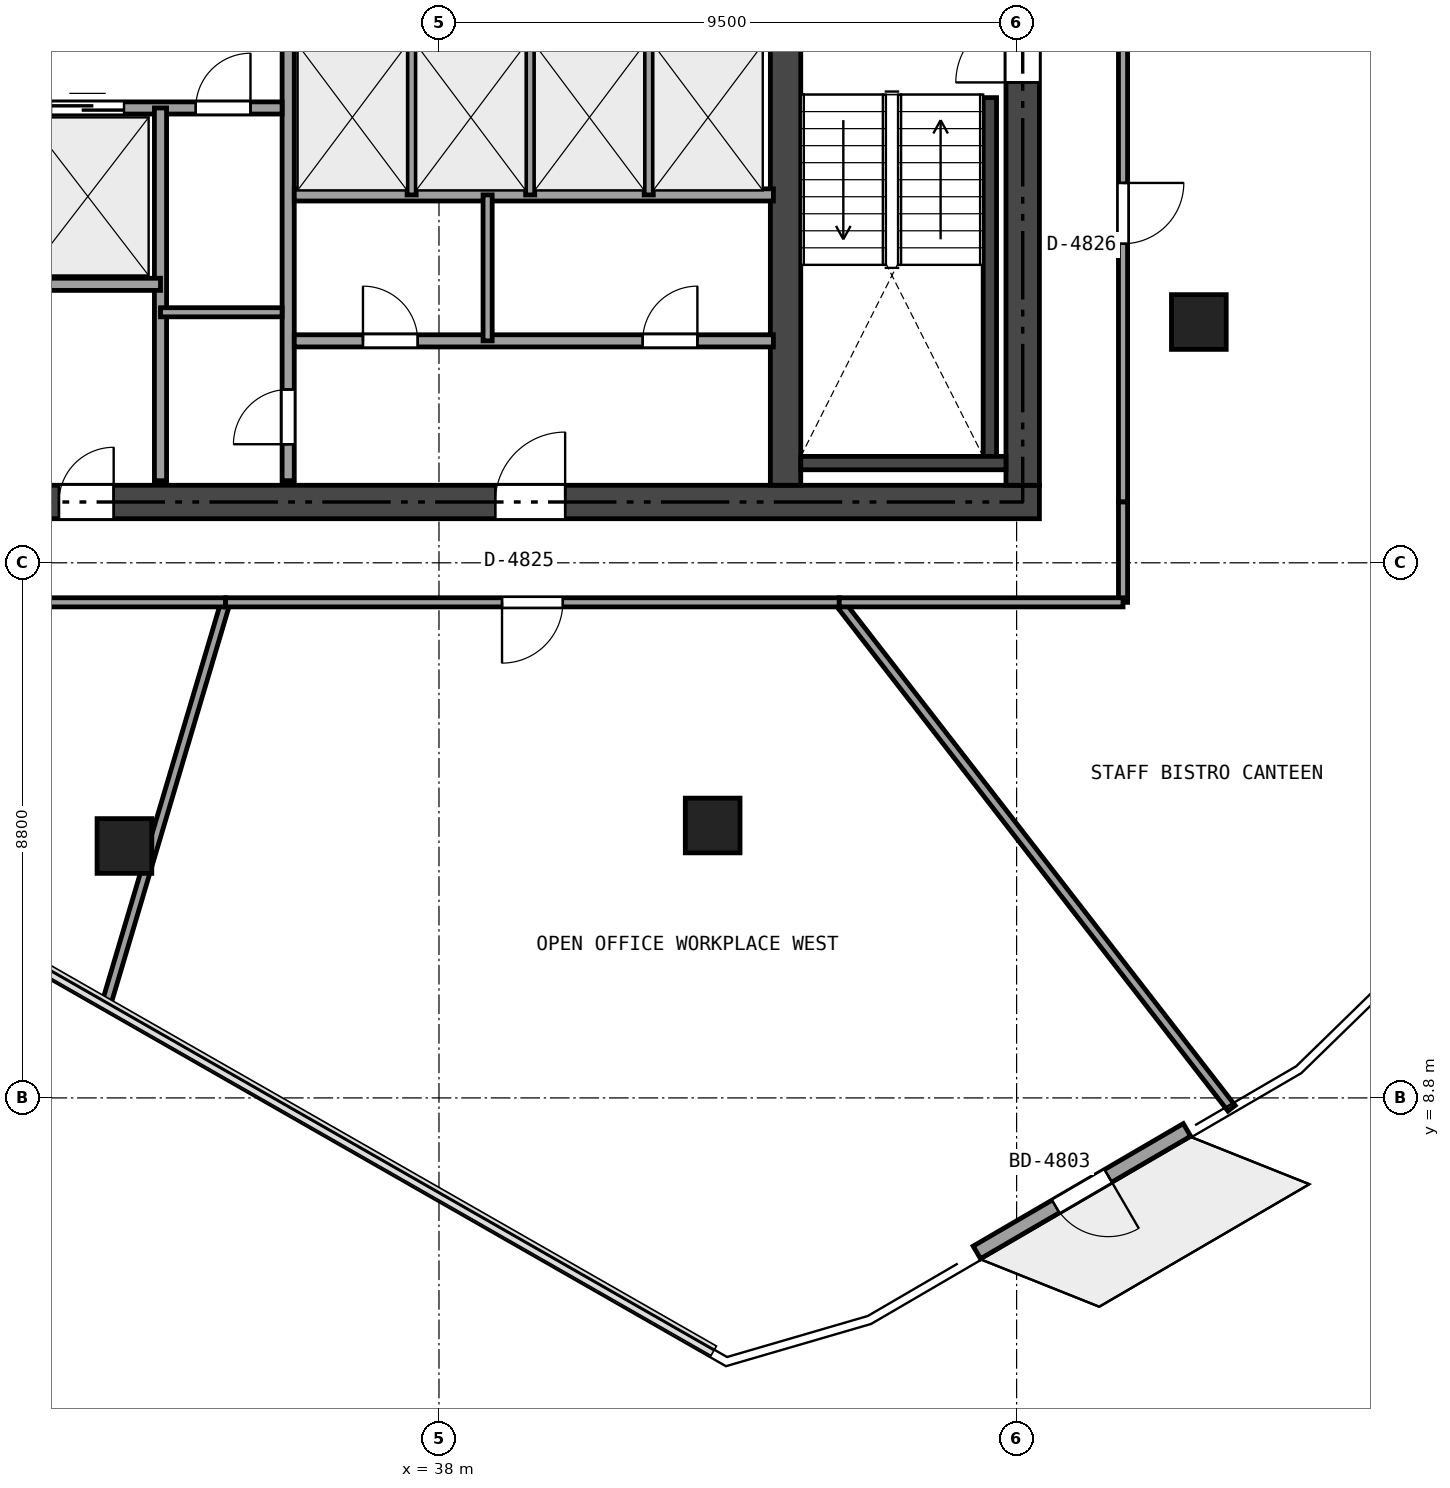
"""IFC4 building model, lengths in metres.
Left out: names, types, materials, properties, quantities, classifications, styles, units other than length and angle.
Written with IfcOpenShell. Run it as: python <this file> out.ifc"""

import sys

from ifc_helpers import new_model, si_unit, direction, frame, frame_2d, origin, origin_2d, place, context, subcontext, project, spatial, rectangle, extrude, element, fill, save


model = new_model("IFC4")
c1 = context("Model", 3, precision=1e-05, world=origin(), true_north=direction((0.0, 1.0)))
c2 = subcontext(c1, "Body", "Model", "MODEL_VIEW")
j1 = project(units=[si_unit("LENGTHUNIT", "METRE"), si_unit("PLANEANGLEUNIT", "RADIAN")], contexts=[c1])
p1 = place(None, origin())
s1 = spatial("IfcSite", under=j1, at=p1, CompositionType="ELEMENT")
p2 = place(p1, origin())
s2 = spatial("IfcBuilding", under=s1, at=p2, CompositionType="ELEMENT")
p3 = place(p2, frame((0.0, 0.0, 180.6)))
s3 = spatial("IfcBuildingStorey", under=s2, at=p3, CompositionType="ELEMENT", Elevation=180.6)
p4 = place(p3, frame((26.525, 18.6, 0.0), z_axis=(0.0, 0.0, 1.0), x_axis=(1.0, 0.0, 0.0)))
e1 = element("IfcWall", 1, at=p4, inside=s3, PredefinedType="SHEAR", context=c2, shape_type="SweptSolid", body=[
    extrude(rectangle(XDim=21.35, YDim=0.55, at=frame_2d((10.675, 0.0))), origin(), (0.0, 0.0, 1.0), 3.32),
])
p5 = place(p4, frame((12.4, 0.0, 0.0)))
e2 = element("IfcOpeningElement", 2, at=p5, cuts=e1, PredefinedType="OPENING", context=c2, shape_type="SweptSolid", body=[
    extrude(rectangle(XDim=1.15, YDim=2.15, at=frame_2d((0.575, 1.075))), frame((0.0, 0.285, 0.0), z_axis=(0.0, -1.0, 0.0), x_axis=(1.0, 0.0, 0.0)), (0.0, 0.0, 1.0), 0.57),
])
p6 = place(p4, frame((5.225, 0.0, 0.0)))
e3 = element("IfcOpeningElement", 3, at=p6, cuts=e1, PredefinedType="OPENING", context=c2, shape_type="SweptSolid", body=[
    extrude(rectangle(XDim=0.9, YDim=2.1, at=frame_2d((0.45, 1.05))), frame((0.0, 0.285, 0.0), z_axis=(0.0, -1.0, 0.0), x_axis=(1.0, 0.0, 0.0)), (0.0, 0.0, 1.0), 0.57),
])
p7 = place(p3, frame((47.6, 18.875, 0.0), z_axis=(0.0, 0.0, 1.0), x_axis=(0.0, 1.0, 0.0)))
e4 = element("IfcWall", 4, at=p7, inside=s3, PredefinedType="SHEAR", context=c2, shape_type="SweptSolid", body=[
    extrude(rectangle(XDim=15.05, YDim=0.55, at=frame_2d((7.525, 0.0))), origin(), (0.0, 0.0, 1.0), 3.32),
])
p8 = place(p7, frame((6.625, 0.0, 0.0)))
e5 = element("IfcOpeningElement", 5, at=p8, cuts=e4, PredefinedType="OPENING", context=c2, shape_type="SweptSolid", body=[
    extrude(rectangle(XDim=1.1, YDim=2.15, at=frame_2d((0.55, 1.075))), frame((0.0, 0.285, 0.0), z_axis=(0.0, -1.0, 0.0), x_axis=(1.0, 0.0, 0.0)), (0.0, 0.0, 1.0), 0.57),
])
p9 = place(p7, frame((8.525, 0.0, 0.0)))
e6 = element("IfcOpeningElement", 6, at=p9, cuts=e4, PredefinedType="OPENING", context=c2, shape_type="SweptSolid", body=[
    extrude(rectangle(XDim=0.9, YDim=2.1, at=frame_2d((0.45, 1.05))), frame((0.0, 0.285, 0.0), z_axis=(0.0, -1.0, 0.0), x_axis=(1.0, 0.0, 0.0)), (0.0, 0.0, 1.0), 0.57),
])
p10 = place(p7, frame((13.175, 0.0, 0.0)))
e7 = element("IfcOpeningElement", 7, at=p10, cuts=e4, PredefinedType="OPENING", context=c2, shape_type="SweptSolid", body=[
    extrude(rectangle(XDim=0.9, YDim=2.1, at=frame_2d((0.45, 1.05))), frame((0.0, 0.285, 0.0), z_axis=(0.0, -1.0, 0.0), x_axis=(1.0, 0.0, 0.0)), (0.0, 0.0, 1.0), 0.57),
])
p11 = place(p3, frame((43.7, 18.875, 0.0), z_axis=(0.0, 0.0, 1.0), x_axis=(0.0, 1.0, 0.0)))
e8 = element("IfcWall", 8, at=p11, inside=s3, PredefinedType="SHEAR", context=c2, shape_type="SweptSolid", body=[
    extrude(rectangle(XDim=15.05, YDim=0.5, at=frame_2d((7.525, 0.0))), origin(), (0.0, 0.0, 1.0), 3.32),
])
p12 = place(p11, frame((8.125, 0.0, 0.0)))
e9 = element("IfcOpeningElement", 9, at=p12, cuts=e8, PredefinedType="OPENING", context=c2, shape_type="SweptSolid", body=[
    extrude(rectangle(XDim=0.9, YDim=2.1, at=frame_2d((0.45, 1.05))), frame((0.0, 0.26, 0.0), z_axis=(0.0, -1.0, 0.0), x_axis=(1.0, 0.0, 0.0)), (0.0, 0.0, 1.0), 0.52),
])
p13 = place(p3, frame((47.06, 19.35, 0.0), z_axis=(0.0, 0.0, 1.0), x_axis=(0.0, 1.0, 0.0)))
e10 = element("IfcWall", 10, at=p13, inside=s3, PredefinedType="SHEAR", context=c2, shape_type="SweptSolid", body=[
    extrude(rectangle(XDim=5.9, YDim=0.22, at=frame_2d((2.95, 0.0))), origin(), (0.0, 0.0, 1.0), 3.32),
])
p14 = place(p3, frame((43.95, 19.24, 0.0), z_axis=(0.0, 0.0, 1.0), x_axis=(1.0, 0.0, 0.0)))
e11 = element("IfcWall", 11, at=p14, inside=s3, PredefinedType="SHEAR", context=c2, shape_type="SweptSolid", body=[
    extrude(rectangle(XDim=3.375, YDim=0.22, at=frame_2d((1.688, 0.0))), origin(), (0.0, 0.0, 1.0), 3.32),
])
for number, where, z_axis, x_axis in (
    (12, (32.827, 12.943, 0.0), (0.0, 0.0, 1.0), (1.0, 0.0, 0.0)),
    (13, (42.501, 13.28, 0.0), (0.0, 0.0, 1.0), (1.0, 0.0, 0.0)),
    (14, (50.497, 21.56, 0.0), (0.0, 0.0, 1.0), (1.0, 0.0, 0.0)),
):
    element("IfcColumn", number, at=place(p3, frame(where, z_axis=z_axis, x_axis=x_axis)), inside=s3, PredefinedType="COLUMN", context=c2, shape_type="SweptSolid", body=[
        extrude(rectangle(XDim=0.9, YDim=0.9, at=origin_2d()), origin(), (0.0, 0.0, 1.0), 3.32),
    ])
p15 = place(p3, frame((50.302, 8.274, 0.0), z_axis=(0.0, 0.0, 1.0), x_axis=(-0.863902826637, -0.50365852135, 0.0)))
e15 = element("IfcWall", 15, at=p15, inside=s3, PredefinedType="SOLIDWALL", context=c2, shape_type="SweptSolid", body=[
    extrude(rectangle(XDim=4.0, YDim=0.24, at=frame_2d((2.0, 0.0))), origin(), (0.0, 0.0, 1.0), 3.32),
])
p16 = place(p15, frame((1.5, 0.0, 0.0)))
e16 = element("IfcOpeningElement", 16, at=p16, cuts=e15, PredefinedType="OPENING", context=c2, shape_type="SweptSolid", body=[
    extrude(rectangle(XDim=1.0, YDim=2.15, at=frame_2d((0.5, 1.075))), frame((0.0, 0.13, 0.0), z_axis=(0.0, -1.0, 0.0), x_axis=(1.0, 0.0, 0.0)), (0.0, 0.0, 1.0), 0.26),
])
p17 = place(p3, frame((35.52, 18.95, 0.0), z_axis=(0.0, 0.0, 1.0), x_axis=(0.0, 1.0, 0.0)))
e17 = element("IfcWall", 17, at=p17, inside=s3, PredefinedType="SOLIDWALL", context=c2, shape_type="SweptSolid", body=[
    extrude(rectangle(XDim=14.9, YDim=0.2, at=frame_2d((7.45, 0.0))), origin(), (0.0, 0.0, 1.0), 2.841),
])
p18 = place(p17, frame((7.755, 0.0, 0.0)))
e18 = element("IfcOpeningElement", 18, at=p18, cuts=e17, PredefinedType="OPENING", context=c2, shape_type="SweptSolid", body=[
    extrude(rectangle(XDim=0.95, YDim=2.15, at=frame_2d((0.475, 1.075))), frame((0.0, 0.11, 0.0), z_axis=(0.0, -1.0, 0.0), x_axis=(1.0, 0.0, 0.0)), (0.0, 0.0, 1.0), 0.22),
])
p19 = place(p17, frame((0.6, 0.0, 0.0)))
e19 = element("IfcOpeningElement", 19, at=p19, cuts=e17, PredefinedType="OPENING", context=c2, shape_type="SweptSolid", body=[
    extrude(rectangle(XDim=0.9, YDim=2.1, at=frame_2d((0.45, 1.05))), frame((0.0, 0.11, 0.0), z_axis=(0.0, -1.0, 0.0), x_axis=(1.0, 0.0, 0.0)), (0.0, 0.0, 1.0), 0.22),
])
p20 = place(p3, frame((31.0, 25.08, 0.0), z_axis=(0.0, 0.0, 1.0), x_axis=(1.0, 0.0, 0.0)))
e20 = element("IfcWall", 20, at=p20, inside=s3, PredefinedType="SOLIDWALL", context=c2, shape_type="SweptSolid", body=[
    extrude(rectangle(XDim=4.42, YDim=0.2, at=frame_2d((2.21, 0.0))), origin(), (0.0, 0.0, 1.0), 3.32),
])
p21 = place(p20, frame((3.0, 0.0, 0.0)))
e21 = element("IfcOpeningElement", 21, at=p21, cuts=e20, PredefinedType="OPENING", context=c2, shape_type="SweptSolid", body=[
    extrude(rectangle(XDim=0.9, YDim=2.1, at=frame_2d((0.45, 1.05))), frame((0.0, 0.11, 0.0), z_axis=(0.0, -1.0, 0.0), x_axis=(1.0, 0.0, 0.0)), (0.0, 0.0, 1.0), 0.22),
])
p22 = place(p20, frame((0.62, 0.0, 0.0)))
e22 = element("IfcOpeningElement", 22, at=p22, cuts=e20, PredefinedType="OPENING", context=c2, shape_type="SweptSolid", body=[
    extrude(rectangle(XDim=1.2, YDim=2.15, at=frame_2d((0.6, 1.075))), frame((0.0, 0.11, 0.0), z_axis=(0.0, -1.0, 0.0), x_axis=(1.0, 0.0, 0.0)), (0.0, 0.0, 1.0), 0.22),
])
p23 = place(p3, frame((33.42, 18.95, 0.0), z_axis=(0.0, 0.0, 1.0), x_axis=(0.0, 1.0, 0.0)))
e23 = element("IfcWall", 23, at=p23, inside=s3, PredefinedType="SOLIDWALL", context=c2, shape_type="SweptSolid", body=[
    extrude(rectangle(XDim=6.13, YDim=0.2, at=frame_2d((3.065, 0.0))), origin(), (0.0, 0.0, 1.0), 2.841),
])
p24 = place(p3, frame((31.0, 22.18, 0.0), z_axis=(0.0, 0.0, 1.0), x_axis=(1.0, 0.0, 0.0)))
e24 = element("IfcWall", 24, at=p24, inside=s3, PredefinedType="SOLIDWALL", context=c2, shape_type="SweptSolid", body=[
    extrude(rectangle(XDim=2.42, YDim=0.2, at=frame_2d((1.21, 0.0))), origin(), (0.0, 0.0, 1.0), 3.32),
])
p25 = place(p3, frame((33.42, 21.72, 0.0), z_axis=(0.0, 0.0, 1.0), x_axis=(1.0, 0.0, 0.0)))
e25 = element("IfcWall", 25, at=p25, inside=s3, PredefinedType="PARTITIONING", context=c2, shape_type="SweptSolid", body=[
    extrude(rectangle(XDim=2.0, YDim=0.15, at=frame_2d((1.0, 0.0))), origin(), (0.0, 0.0, 1.0), 3.32),
])
p26 = place(p3, frame((35.62, 23.65, 0.0), z_axis=(0.0, 0.0, 1.0), x_axis=(1.0, 0.0, 0.0)))
e26 = element("IfcWall", 26, at=p26, inside=s3, PredefinedType="SOLIDWALL", context=c2, shape_type="SweptSolid", body=[
    extrude(rectangle(XDim=7.88, YDim=0.2, at=frame_2d((3.94, 0.0))), origin(), (0.0, 0.0, 1.0), 2.841),
])
p27 = place(p3, frame((35.62, 21.25, 0.0), z_axis=(0.0, 0.0, 1.0), x_axis=(1.0, 0.0, 0.0)))
e27 = element("IfcWall", 27, at=p27, inside=s3, PredefinedType="SOLIDWALL", context=c2, shape_type="SweptSolid", body=[
    extrude(rectangle(XDim=7.88, YDim=0.2, at=frame_2d((3.94, 0.0))), origin(), (0.0, 0.0, 1.0), 3.32),
])
p28 = place(p27, frame((1.13, 0.0, 0.0)))
e28 = element("IfcOpeningElement", 28, at=p28, cuts=e27, PredefinedType="OPENING", context=c2, shape_type="SweptSolid", body=[
    extrude(rectangle(XDim=0.9, YDim=2.1, at=frame_2d((0.45, 1.05))), frame((0.0, 0.11, 0.0), z_axis=(0.0, -1.0, 0.0), x_axis=(1.0, 0.0, 0.0)), (0.0, 0.0, 1.0), 0.22),
])
p29 = place(p27, frame((5.73, 0.0, 0.0)))
e29 = element("IfcOpeningElement", 29, at=p29, cuts=e27, PredefinedType="OPENING", context=c2, shape_type="SweptSolid", body=[
    extrude(rectangle(XDim=0.9, YDim=2.1, at=frame_2d((0.45, 1.05))), frame((0.0, 0.11, 0.0), z_axis=(0.0, -1.0, 0.0), x_axis=(1.0, 0.0, 0.0)), (0.0, 0.0, 1.0), 0.22),
])
for number, where, z_axis, x_axis in (
    (30, (37.55, 23.65, 0.0), (0.0, 0.0, 1.0), (0.0, 1.0, 0.0)),
    (31, (39.5, 23.65, 0.0), (0.0, 0.0, 1.0), (0.0, 1.0, 0.0)),
    (32, (41.45, 23.65, 0.0), (0.0, 0.0, 1.0), (0.0, 1.0, 0.0)),
):
    element("IfcWall", number, at=place(p3, frame(where, z_axis=z_axis, x_axis=x_axis)), inside=s3, PredefinedType="PARTITIONING", context=c2, shape_type="SweptSolid", body=[
        extrude(rectangle(XDim=2.55, YDim=0.15, at=frame_2d((1.275, 0.0))), origin(), (0.0, 0.0, 1.0), 2.841),
    ])
p30 = place(p3, frame((38.8, 21.25, 0.0), z_axis=(0.0, 0.0, 1.0), x_axis=(0.0, 1.0, 0.0)))
e33 = element("IfcWall", 33, at=p30, inside=s3, PredefinedType="PARTITIONING", context=c2, shape_type="SweptSolid", body=[
    extrude(rectangle(XDim=2.4, YDim=0.15, at=frame_2d((1.2, 0.0))), origin(), (0.0, 0.0, 1.0), 2.841),
])
p31 = place(p3, frame((32.518, 10.311, 0.0), z_axis=(0.0, 0.0, 1.0), x_axis=(0.284730403607, 0.958607634677, 0.0)))
e34 = element("IfcWall", 34, at=p31, inside=s3, PredefinedType="PARTITIONING", context=c2, shape_type="SweptSolid", body=[
    extrude(rectangle(XDim=6.926, YDim=0.15, at=frame_2d((3.463, 0.0))), origin(), (0.0, 0.0, 1.0), 2.905),
])
p32 = place(p3, frame((34.49, 16.95, 0.0), z_axis=(0.0, 0.0, 1.0), x_axis=(-1.0, 0.0, 0.0)))
e35 = element("IfcWall", 35, at=p32, inside=s3, PredefinedType="PARTITIONING", context=c2, shape_type="SweptSolid", body=[
    extrude(rectangle(XDim=7.69, YDim=0.15, at=frame_2d((3.845, 0.0))), origin(), (0.0, 0.0, 1.0), 2.697),
])
p33 = place(p32, frame((3.345, 0.0, 0.0)))
e36 = element("IfcOpeningElement", 36, at=p33, cuts=e35, PredefinedType="OPENING", context=c2, shape_type="SweptSolid", body=[
    extrude(rectangle(XDim=1.0, YDim=2.15, at=frame_2d((0.5, 1.075))), frame((0.0, 0.085, 0.0), z_axis=(0.0, -1.0, 0.0), x_axis=(1.0, 0.0, 0.0)), (0.0, 0.0, 1.0), 0.17),
])
p34 = place(p3, frame((51.035, 8.63, 0.0), z_axis=(0.0, 0.0, 1.0), x_axis=(-0.612800173813, 0.790237905301, 0.0)))
e37 = element("IfcWall", 37, at=p34, inside=s3, PredefinedType="PARTITIONING", context=c2, shape_type="SweptSolid", body=[
    extrude(rectangle(XDim=10.529, YDim=0.15, at=frame_2d((5.264, 0.0))), origin(), (0.0, 0.0, 1.0), 2.841),
])
p35 = place(p3, frame((44.583, 16.95, 0.0), z_axis=(0.0, 0.0, 1.0), x_axis=(-1.0, 0.0, 0.0)))
e38 = element("IfcWall", 38, at=p35, inside=s3, PredefinedType="PARTITIONING", context=c2, shape_type="SweptSolid", body=[
    extrude(rectangle(XDim=10.093, YDim=0.15, at=frame_2d((5.046, 0.0))), origin(), (0.0, 0.0, 1.0), 2.697),
])
p36 = place(p35, frame((4.546, 0.0, 0.0)))
e39 = element("IfcOpeningElement", 39, at=p36, cuts=e38, PredefinedType="OPENING", context=c2, shape_type="SweptSolid", body=[
    extrude(rectangle(XDim=1.0, YDim=2.15, at=frame_2d((0.5, 1.075))), frame((0.0, 0.085, 0.0), z_axis=(0.0, -1.0, 0.0), x_axis=(1.0, 0.0, 0.0)), (0.0, 0.0, 1.0), 0.17),
])
p37 = place(p3, frame((49.25, 28.094, 0.0), z_axis=(0.0, 0.0, 1.0), x_axis=(0.0, -1.0, 0.0)))
e40 = element("IfcWall", 40, at=p37, inside=s3, PredefinedType="PARTITIONING", context=c2, shape_type="SweptSolid", body=[
    extrude(rectangle(XDim=9.494, YDim=0.15, at=frame_2d((4.747, 0.0))), origin(), (0.0, 0.0, 1.0), 2.697),
])
p38 = place(p37, frame((4.247, 0.0, 0.0)))
e41 = element("IfcOpeningElement", 41, at=p38, cuts=e40, PredefinedType="OPENING", context=c2, shape_type="SweptSolid", body=[
    extrude(rectangle(XDim=1.0, YDim=2.15, at=frame_2d((0.5, 1.075))), frame((0.0, 0.085, 0.0), z_axis=(0.0, -1.0, 0.0), x_axis=(1.0, 0.0, 0.0)), (0.0, 0.0, 1.0), 0.17),
])
p39 = place(p3, frame((49.25, 18.6, 0.0), z_axis=(0.0, 0.0, 1.0), x_axis=(0.0, -1.0, 0.0)))
e42 = element("IfcWall", 42, at=p39, inside=s3, PredefinedType="PARTITIONING", context=c2, shape_type="SweptSolid", body=[
    extrude(rectangle(XDim=1.65, YDim=0.15, at=frame_2d((0.825, 0.0))), origin(), (0.0, 0.0, 1.0), 3.32),
])
p40 = place(p3, frame((49.25, 16.95, 0.0), z_axis=(0.0, 0.0, 1.0), x_axis=(-1.0, 0.0, 0.0)))
e43 = element("IfcWall", 43, at=p40, inside=s3, PredefinedType="PARTITIONING", context=c2, shape_type="SweptSolid", body=[
    extrude(rectangle(XDim=4.667, YDim=0.15, at=frame_2d((2.333, 0.0))), origin(), (0.0, 0.0, 1.0), 2.841),
])
p41 = place(p16, origin())
e44 = element("IfcDoor", 44, at=p41, inside=s3, OperationType="SINGLE_SWING_LEFT", PredefinedType="DOOR", context=c2, shape_type="SweptSolid", body=[
    extrude(rectangle(XDim=1.0, YDim=2.15, at=frame_2d((0.5, 1.075))), frame((0.0, 0.025, 0.0), z_axis=(0.0, -1.0, 0.0), x_axis=(1.0, 0.0, 0.0)), (0.0, 0.0, 1.0), 0.05),
])
fill(e16, e44)
p42 = place(p8, origin())
e45 = element("IfcDoor", 45, at=p42, inside=s3, OperationType="SINGLE_SWING_LEFT", PredefinedType="DOOR", context=c2, shape_type="SweptSolid", body=[
    extrude(rectangle(XDim=1.1, YDim=2.15, at=frame_2d((0.55, 1.075))), frame((0.0, 0.025, 0.0), z_axis=(0.0, -1.0, 0.0), x_axis=(1.0, 0.0, 0.0)), (0.0, 0.0, 1.0), 0.05),
])
fill(e5, e45)
p43 = place(p5, origin())
e46 = element("IfcDoor", 46, at=p43, inside=s3, OperationType="SINGLE_SWING_RIGHT", PredefinedType="DOOR", context=c2, shape_type="SweptSolid", body=[
    extrude(rectangle(XDim=1.15, YDim=2.15, at=frame_2d((0.575, 1.075))), frame((0.0, 0.025, 0.0), z_axis=(0.0, -1.0, 0.0), x_axis=(1.0, 0.0, 0.0)), (0.0, 0.0, 1.0), 0.05),
])
fill(e2, e46)
p44 = place(p6, origin())
e47 = element("IfcDoor", 47, at=p44, inside=s3, OperationType="SINGLE_SWING_RIGHT", PredefinedType="DOOR", context=c2, shape_type="SweptSolid", body=[
    extrude(rectangle(XDim=0.9, YDim=2.1, at=frame_2d((0.45, 1.05))), frame((0.0, 0.025, 0.0), z_axis=(0.0, -1.0, 0.0), x_axis=(1.0, 0.0, 0.0)), (0.0, 0.0, 1.0), 0.05),
])
fill(e3, e47)
p45 = place(p19, origin())
e48 = element("IfcDoor", 48, at=p45, inside=s3, OperationType="SINGLE_SWING_LEFT", PredefinedType="DOOR", context=c2, shape_type="SweptSolid", body=[
    extrude(rectangle(XDim=0.9, YDim=2.1, at=frame_2d((0.45, 1.05))), frame((0.0, 0.025, 0.0), z_axis=(0.0, -1.0, 0.0), x_axis=(1.0, 0.0, 0.0)), (0.0, 0.0, 1.0), 0.05),
])
fill(e19, e48)
p46 = place(p21, origin())
e49 = element("IfcDoor", 49, at=p46, inside=s3, OperationType="SINGLE_SWING_RIGHT", PredefinedType="DOOR", context=c2, shape_type="SweptSolid", body=[
    extrude(rectangle(XDim=0.9, YDim=2.1, at=frame_2d((0.45, 1.05))), frame((0.0, 0.025, 0.0), z_axis=(0.0, -1.0, 0.0), x_axis=(1.0, 0.0, 0.0)), (0.0, 0.0, 1.0), 0.05),
])
fill(e21, e49)
p47 = place(p28, origin())
e50 = element("IfcDoor", 50, at=p47, inside=s3, OperationType="SINGLE_SWING_LEFT", PredefinedType="DOOR", context=c2, shape_type="SweptSolid", body=[
    extrude(rectangle(XDim=0.9, YDim=2.1, at=frame_2d((0.45, 1.05))), frame((0.0, 0.025, 0.0), z_axis=(0.0, -1.0, 0.0), x_axis=(1.0, 0.0, 0.0)), (0.0, 0.0, 1.0), 0.05),
])
fill(e28, e50)
p48 = place(p29, origin())
e51 = element("IfcDoor", 51, at=p48, inside=s3, OperationType="SINGLE_SWING_RIGHT", PredefinedType="DOOR", context=c2, shape_type="SweptSolid", body=[
    extrude(rectangle(XDim=0.9, YDim=2.1, at=frame_2d((0.45, 1.05))), frame((0.0, 0.025, 0.0), z_axis=(0.0, -1.0, 0.0), x_axis=(1.0, 0.0, 0.0)), (0.0, 0.0, 1.0), 0.05),
])
fill(e29, e51)
p49 = place(p22, origin())
e52 = element("IfcDoor", 52, at=p49, inside=s3, OperationType="SLIDING_TO_LEFT", PredefinedType="DOOR", context=c2, shape_type="SweptSolid", body=[
    extrude(rectangle(XDim=1.2, YDim=2.15, at=frame_2d((0.6, 1.075))), frame((0.0, 0.025, 0.0), z_axis=(0.0, -1.0, 0.0), x_axis=(1.0, 0.0, 0.0)), (0.0, 0.0, 1.0), 0.05),
])
fill(e22, e52)
p50 = place(p36, origin())
e53 = element("IfcDoor", 53, at=p50, inside=s3, OperationType="SINGLE_SWING_RIGHT", PredefinedType="DOOR", context=c2, shape_type="SweptSolid", body=[
    extrude(rectangle(XDim=1.0, YDim=2.15, at=frame_2d((0.5, 1.075))), frame((0.0, 0.025, 0.0), z_axis=(0.0, -1.0, 0.0), x_axis=(1.0, 0.0, 0.0)), (0.0, 0.0, 1.0), 0.05),
])
fill(e39, e53)
p51 = place(p38, origin())
e54 = element("IfcDoor", 54, at=p51, inside=s3, OperationType="SINGLE_SWING_LEFT", PredefinedType="DOOR", context=c2, shape_type="SweptSolid", body=[
    extrude(rectangle(XDim=1.0, YDim=2.15, at=frame_2d((0.5, 1.075))), frame((0.0, 0.025, 0.0), z_axis=(0.0, -1.0, 0.0), x_axis=(1.0, 0.0, 0.0)), (0.0, 0.0, 1.0), 0.05),
])
fill(e41, e54)
save(model, sys.argv[1])
